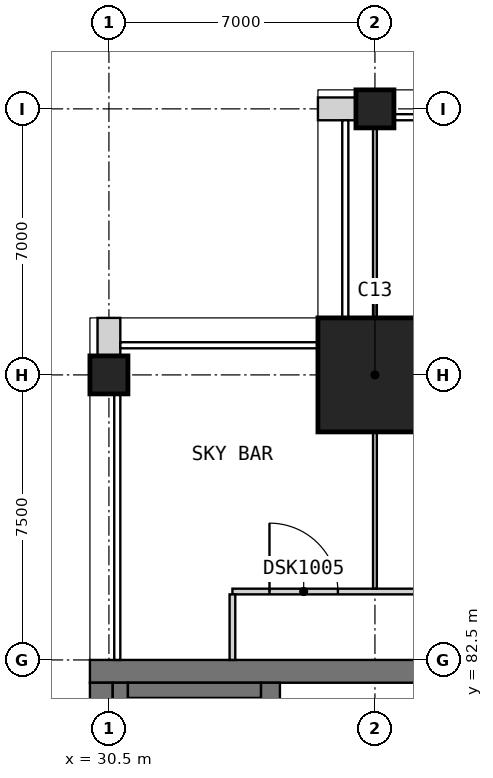
"""IFC4 building model, lengths in metres.
Left out: names, types, materials, properties, quantities, classifications, styles, units other than length and angle.
Written with IfcOpenShell. Run it as: python <this file> out.ifc"""

import sys

from ifc_helpers import new_model, si_unit, direction, frame, frame_2d, origin, origin_2d, place, context, subcontext, project, spatial, rectangle, extrude, element, fill, save


model = new_model("IFC4")
c1 = context("Model", 3, precision=1e-05, world=origin(), true_north=direction((0.0, 1.0)))
c2 = subcontext(c1, "Body", "Model", "MODEL_VIEW")
j1 = project(units=[si_unit("LENGTHUNIT", "METRE"), si_unit("PLANEANGLEUNIT", "RADIAN")], contexts=[c1])
p1 = place(None, origin())
s1 = spatial("IfcSite", under=j1, at=p1, CompositionType="ELEMENT")
p2 = place(p1, origin())
s2 = spatial("IfcBuilding", under=s1, at=p2, CompositionType="ELEMENT")
p3 = place(p2, frame((0.0, 0.0, 297.7)))
s3 = spatial("IfcBuildingStorey", under=s2, at=p3, CompositionType="ELEMENT", Elevation=297.7)
for number, where, z_axis, x_axis in (
    (1, (30.5, 90.0, 0.0), (0.0, 0.0, 1.0), (1.0, 0.0, 0.0)),
    (2, (37.5, 97.0, 0.0), (0.0, 0.0, 1.0), (1.0, 0.0, 0.0)),
):
    element("IfcColumn", number, at=place(p3, frame(where, z_axis=z_axis, x_axis=x_axis)), inside=s3, PredefinedType="COLUMN", context=c2, shape_type="SweptSolid", body=[
        extrude(rectangle(XDim=1.0, YDim=1.0, at=origin_2d()), origin(), (0.0, 0.0, 1.0), 5.0),
    ])
p4 = place(p3, frame((37.5, 90.0, 0.0), z_axis=(0.0, 0.0, 1.0), x_axis=(1.0, 0.0, 0.0)))
e3 = element("IfcColumn", 3, at=p4, inside=s3, PredefinedType="COLUMN", context=c2, shape_type="SweptSolid", body=[
    extrude(rectangle(XDim=3.0, YDim=3.0, at=origin_2d()), origin(), (0.0, 0.0, 1.0), 5.0),
])
p5 = place(p3, frame((30.0, 82.2, 0.0), z_axis=(0.0, 0.0, 1.0), x_axis=(1.0, 0.0, 0.0)))
e4 = element("IfcWall", 4, at=p5, inside=s3, PredefinedType="SHEAR", context=c2, shape_type="SweptSolid", body=[
    extrude(rectangle(XDim=30.0, YDim=0.6, at=frame_2d((15.0, 0.0))), origin(), (0.0, 0.0, 1.0), 5.0),
])
p6 = place(p3, frame((30.3, 60.6, 0.0), z_axis=(0.0, 0.0, 1.0), x_axis=(0.0, 1.0, 0.0)))
e5 = element("IfcWall", 5, at=p6, inside=s3, PredefinedType="SHEAR", context=c2, shape_type="SweptSolid", body=[
    extrude(rectangle(XDim=21.3, YDim=0.6, at=frame_2d((10.65, 0.0))), origin(), (0.0, 0.0, 1.0), 5.0),
])
p7 = place(p3, frame((34.75, 78.3, 0.0), z_axis=(0.0, 0.0, 1.0), x_axis=(0.0, 1.0, 0.0)))
e6 = element("IfcWall", 6, at=p7, inside=s3, PredefinedType="SHEAR", context=c2, shape_type="SweptSolid", body=[
    extrude(rectangle(XDim=3.6, YDim=0.5, at=frame_2d((1.8, 0.0))), origin(), (0.0, 0.0, 1.0), 5.0),
])
for number, where, z_axis, x_axis in (
    (7, (37.0, 97.0, 0.0), (0.0, 0.0, 1.0), (-1.0, 0.0, 0.0)),
    (8, (30.5, 91.5, 0.0), (0.0, 0.0, 1.0), (0.0, -1.0, 0.0)),
):
    element("IfcWall", number, at=place(p3, frame(where, z_axis=z_axis, x_axis=x_axis)), inside=s3, PredefinedType="SOLIDWALL", context=c2, shape_type="SweptSolid", body=[
        extrude(rectangle(XDim=1.0, YDim=0.6, at=frame_2d((0.5, 0.0))), origin(), (0.0, 0.0, 1.0), 4.7),
    ])
p8 = place(p3, frame((30.8, 60.6, 0.0), z_axis=(0.0, 0.0, 1.0), x_axis=(0.0, 1.0, 0.0)))
e9 = element("IfcWall", 9, at=p8, inside=s3, PredefinedType="SOLIDWALL", context=c2, shape_type="SweptSolid", body=[
    extrude(rectangle(XDim=21.3, YDim=0.4, at=frame_2d((10.65, 0.0))), origin(), (0.0, 0.0, 1.0), 4.7),
])
p9 = place(p3, frame((31.0, 81.7, 0.0), z_axis=(0.0, 0.0, 1.0), x_axis=(1.0, 0.0, 0.0)))
e10 = element("IfcWall", 10, at=p9, inside=s3, PredefinedType="SOLIDWALL", context=c2, shape_type="SweptSolid", body=[
    extrude(rectangle(XDim=3.5, YDim=0.4, at=frame_2d((1.75, 0.0))), origin(), (0.0, 0.0, 1.0), 4.7),
])
p10 = place(p3, frame((33.75, 84.3, 0.0), z_axis=(0.0, 0.0, 1.0), x_axis=(1.0, 0.0, 0.0)))
e11 = element("IfcWall", 11, at=p10, inside=s3, PredefinedType="PARTITIONING", context=c2, shape_type="SweptSolid", body=[
    extrude(rectangle(XDim=28.05, YDim=0.15, at=frame_2d((14.025, 0.0))), origin(), (0.0, 0.0, 1.0), 4.7),
])
p11 = place(p10, frame((0.975, 0.0, 0.0)))
e12 = element("IfcOpeningElement", 12, at=p11, cuts=e11, PredefinedType="OPENING", context=c2, shape_type="SweptSolid", body=[
    extrude(rectangle(XDim=1.8, YDim=2.1, at=frame_2d((0.9, 1.05))), frame((0.0, 0.085, 0.0), z_axis=(0.0, -1.0, 0.0), x_axis=(1.0, 0.0, 0.0)), (0.0, 0.0, 1.0), 0.17),
])
p12 = place(p10, frame((10.35, 0.0, 0.0)))
e13 = element("IfcOpeningElement", 13, at=p12, cuts=e11, PredefinedType="OPENING", context=c2, shape_type="SweptSolid", body=[
    extrude(rectangle(XDim=1.8, YDim=2.1, at=frame_2d((0.9, 1.05))), frame((0.0, 0.085, 0.0), z_axis=(0.0, -1.0, 0.0), x_axis=(1.0, 0.0, 0.0)), (0.0, 0.0, 1.0), 0.17),
])
p13 = place(p10, frame((22.0, 0.0, 0.0)))
e14 = element("IfcOpeningElement", 14, at=p13, cuts=e11, PredefinedType="OPENING", context=c2, shape_type="SweptSolid", body=[
    extrude(rectangle(XDim=1.0, YDim=2.1, at=frame_2d((0.5, 1.05))), frame((0.0, 0.085, 0.0), z_axis=(0.0, -1.0, 0.0), x_axis=(1.0, 0.0, 0.0)), (0.0, 0.0, 1.0), 0.17),
])
p14 = place(p10, frame((26.65, 0.0, 0.0)))
e15 = element("IfcOpeningElement", 15, at=p14, cuts=e11, PredefinedType="OPENING", context=c2, shape_type="SweptSolid", body=[
    extrude(rectangle(XDim=1.0, YDim=2.1, at=frame_2d((0.5, 1.05))), frame((0.0, 0.085, 0.0), z_axis=(0.0, -1.0, 0.0), x_axis=(1.0, 0.0, 0.0)), (0.0, 0.0, 1.0), 0.17),
])
p15 = place(p3, frame((33.75, 82.5, 0.0), z_axis=(0.0, 0.0, 1.0), x_axis=(0.0, 1.0, 0.0)))
e16 = element("IfcWall", 16, at=p15, inside=s3, PredefinedType="PARTITIONING", context=c2, shape_type="SweptSolid", body=[
    extrude(rectangle(XDim=1.725, YDim=0.15, at=frame_2d((0.863, 0.0))), origin(), (0.0, 0.0, 1.0), 4.7),
])
p16 = place(p3, frame((37.5, 84.375, 0.0), z_axis=(0.0, 0.0, 1.0), x_axis=(0.0, 1.0, 0.0)))
e17 = element("IfcWall", 17, at=p16, inside=s3, PredefinedType="PARTITIONING", context=c2, shape_type="SweptSolid", body=[
    extrude(rectangle(XDim=13.125, YDim=0.1, at=frame_2d((6.562, 0.0))), origin(), (0.0, 0.0, 1.0), 4.25),
])
p17 = place(p11, origin())
e18 = element("IfcDoor", 18, at=p17, inside=s3, OperationType="DOUBLE_DOOR_SINGLE_SWING", PredefinedType="DOOR", context=c2, shape_type="SweptSolid", body=[
    extrude(rectangle(XDim=1.8, YDim=2.1, at=frame_2d((0.9, 1.05))), frame((0.0, 0.025, 0.0), z_axis=(0.0, -1.0, 0.0), x_axis=(1.0, 0.0, 0.0)), (0.0, 0.0, 1.0), 0.05),
])
fill(e12, e18)
save(model, sys.argv[1])
